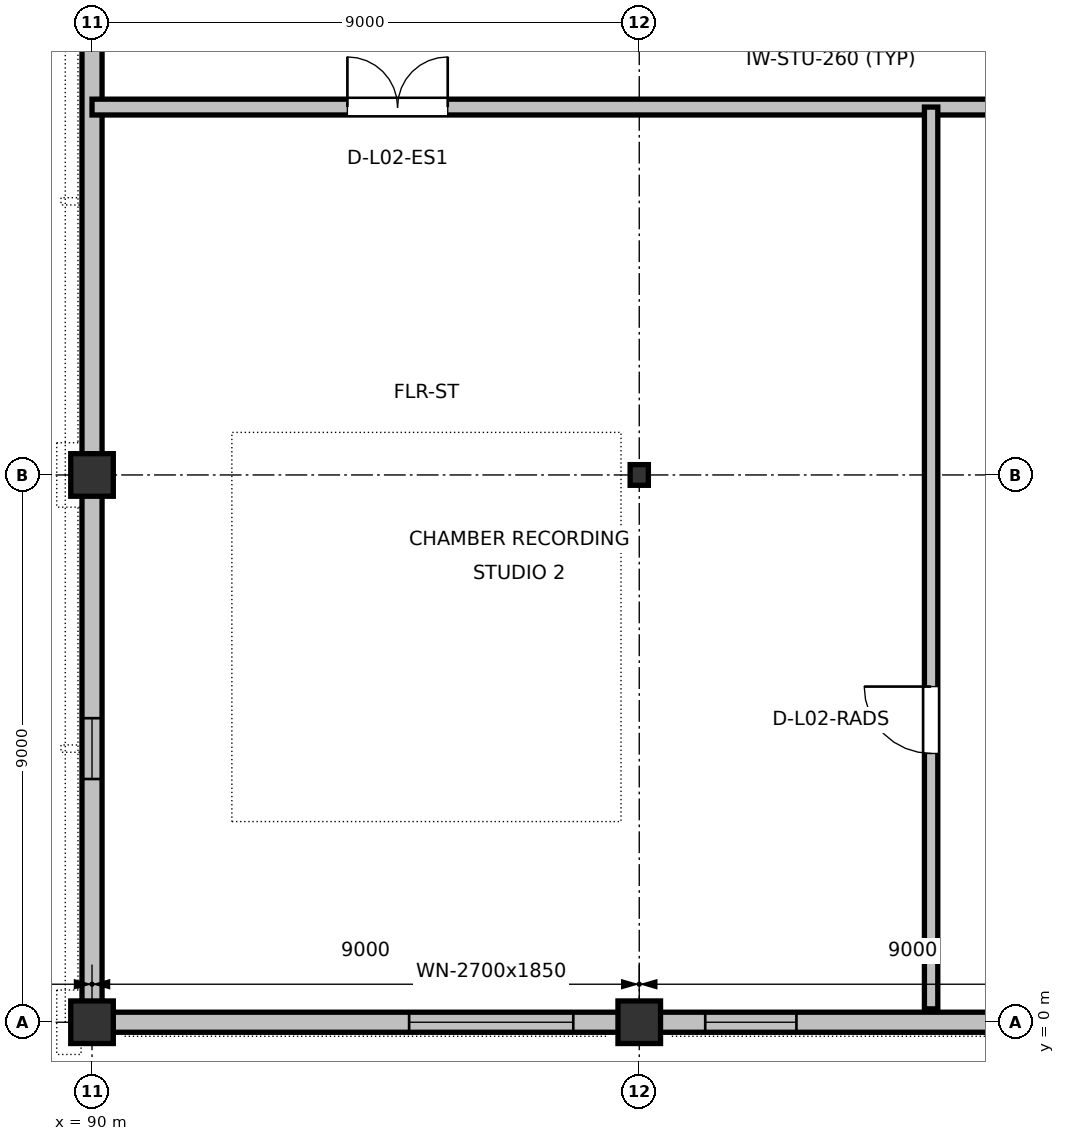
"""IFC4 building model, lengths in metres.
Left out: names, types, materials, properties, quantities, classifications, styles, units other than length and angle.
Written with IfcOpenShell. Run it as: python <this file> out.ifc"""

import sys

from ifc_helpers import new_model, si_unit, direction, frame, frame_2d, origin, origin_2d, place, context, subcontext, project, spatial, rectangle, i_section, extrude, element, fill, save


model = new_model("IFC4")
c1 = context("Model", 3, precision=1e-05, world=origin(), true_north=direction((0.0, 1.0)))
c2 = subcontext(c1, "Body", "Model", "MODEL_VIEW")
j1 = project(units=[si_unit("LENGTHUNIT", "METRE"), si_unit("PLANEANGLEUNIT", "RADIAN")], contexts=[c1])
p1 = place(None, origin())
s1 = spatial("IfcSite", under=j1, at=p1, CompositionType="ELEMENT")
p2 = place(p1, origin())
s2 = spatial("IfcBuilding", under=s1, at=p2, CompositionType="ELEMENT")
p3 = place(p2, frame((0.0, 0.0, 10.2)))
s3 = spatial("IfcBuildingStorey", under=s2, at=p3, CompositionType="ELEMENT", Elevation=10.2)
for number, where, z_axis, x_axis in (
    (1, (90.0, 0.0, 0.0), (0.0, 0.0, 1.0), (1.0, 0.0, 0.0)),
    (2, (90.0, 9.0, 0.0), (0.0, 0.0, 1.0), (1.0, 0.0, 0.0)),
    (3, (99.0, 0.0, 0.0), (0.0, 0.0, 1.0), (1.0, 0.0, 0.0)),
):
    element("IfcColumn", number, at=place(p3, frame(where, z_axis=z_axis, x_axis=x_axis)), inside=s3, PredefinedType="COLUMN", context=c2, shape_type="SweptSolid", body=[
        extrude(rectangle(XDim=0.7, YDim=0.7, at=origin_2d()), origin(), (0.0, 0.0, 1.0), 4.8),
    ])
p4 = place(p3, frame((99.0, 9.0, 0.0), z_axis=(0.0, 0.0, 1.0), x_axis=(1.0, 0.0, 0.0)))
e4 = element("IfcColumn", 4, at=p4, inside=s3, PredefinedType="COLUMN", context=c2, shape_type="SweptSolid", body=[
    extrude(i_section(OverallWidth=0.3, OverallDepth=0.34, WebThickness=0.012, FlangeThickness=0.021, at=origin_2d()), origin(), (0.0, 0.0, 1.0), 4.8),
])
p5 = place(p3, frame((90.0, 8.665, 0.0), z_axis=(0.0, 0.0, 1.0), x_axis=(0.0, -1.0, 0.0)))
e5 = element("IfcWall", 5, at=p5, inside=s3, PredefinedType="STANDARD", context=c2, shape_type="SweptSolid", body=[
    extrude(rectangle(XDim=8.33, YDim=0.33, at=frame_2d((4.165, 0.0))), origin(), (0.0, 0.0, 1.0), 4.235),
])
p6 = place(p5, frame((3.665, 0.0, 0.9)))
e6 = element("IfcOpeningElement", 6, at=p6, cuts=e5, PredefinedType="OPENING", context=c2, shape_type="SweptSolid", body=[
    extrude(rectangle(XDim=1.0, YDim=1.35, at=frame_2d((0.5, 0.675))), frame((0.0, 0.175, 0.0), z_axis=(0.0, -1.0, 0.0), x_axis=(1.0, 0.0, 0.0)), (0.0, 0.0, 1.0), 0.35),
])
p7 = place(p3, frame((90.0, 17.665, 0.0), z_axis=(0.0, 0.0, 1.0), x_axis=(0.0, -1.0, 0.0)))
e7 = element("IfcWall", 7, at=p7, inside=s3, PredefinedType="STANDARD", context=c2, shape_type="SweptSolid", body=[
    extrude(rectangle(XDim=8.33, YDim=0.33, at=frame_2d((4.165, 0.0))), origin(), (0.0, 0.0, 1.0), 4.235),
])
p8 = place(p3, frame((90.335, 0.0, 0.0), z_axis=(0.0, 0.0, 1.0), x_axis=(1.0, 0.0, 0.0)))
e8 = element("IfcWall", 8, at=p8, inside=s3, PredefinedType="STANDARD", context=c2, shape_type="SweptSolid", body=[
    extrude(rectangle(XDim=8.33, YDim=0.33, at=frame_2d((4.165, 0.0))), origin(), (0.0, 0.0, 1.0), 4.235),
])
p9 = place(p8, frame((4.88, 0.0, 0.9)))
e9 = element("IfcOpeningElement", 9, at=p9, cuts=e8, PredefinedType="OPENING", context=c2, shape_type="SweptSolid", body=[
    extrude(rectangle(XDim=2.7, YDim=1.85, at=frame_2d((1.35, 0.925))), frame((0.0, 0.175, 0.0), z_axis=(0.0, -1.0, 0.0), x_axis=(1.0, 0.0, 0.0)), (0.0, 0.0, 1.0), 0.35),
])
p10 = place(p3, frame((99.335, 0.0, 0.0), z_axis=(0.0, 0.0, 1.0), x_axis=(1.0, 0.0, 0.0)))
e10 = element("IfcWall", 10, at=p10, inside=s3, PredefinedType="STANDARD", context=c2, shape_type="SweptSolid", body=[
    extrude(rectangle(XDim=8.33, YDim=0.33, at=frame_2d((4.165, 0.0))), origin(), (0.0, 0.0, 1.0), 4.235),
])
p11 = place(p10, frame((0.75, 0.0, 0.9)))
e11 = element("IfcOpeningElement", 11, at=p11, cuts=e10, PredefinedType="OPENING", context=c2, shape_type="SweptSolid", body=[
    extrude(rectangle(XDim=1.5, YDim=2.2, at=frame_2d((0.75, 1.1))), frame((0.0, 0.175, 0.0), z_axis=(0.0, -1.0, 0.0), x_axis=(1.0, 0.0, 0.0)), (0.0, 0.0, 1.0), 0.35),
])
p12 = place(p3, frame((90.0, 15.05, 0.0), z_axis=(0.0, 0.0, 1.0), x_axis=(1.0, 0.0, 0.0)))
e12 = element("IfcWall", 12, at=p12, inside=s3, PredefinedType="PARTITIONING", context=c2, shape_type="SweptSolid", body=[
    extrude(rectangle(XDim=24.3, YDim=0.26, at=frame_2d((12.15, 0.0))), origin(), (0.0, 0.0, 1.0), 4.215),
])
p13 = place(p12, frame((4.2, 0.0, 0.0)))
e13 = element("IfcOpeningElement", 13, at=p13, cuts=e12, PredefinedType="OPENING", context=c2, shape_type="SweptSolid", body=[
    extrude(rectangle(XDim=1.65, YDim=2.25, at=frame_2d((0.825, 1.125))), frame((0.0, 0.14, 0.0), z_axis=(0.0, -1.0, 0.0), x_axis=(1.0, 0.0, 0.0)), (0.0, 0.0, 1.0), 0.28),
])
p14 = place(p12, frame((16.5, 0.0, 0.0)))
e14 = element("IfcOpeningElement", 14, at=p14, cuts=e12, PredefinedType="OPENING", context=c2, shape_type="SweptSolid", body=[
    extrude(rectangle(XDim=1.45, YDim=2.22, at=frame_2d((0.725, 1.11))), frame((0.0, 0.14, 0.0), z_axis=(0.0, -1.0, 0.0), x_axis=(1.0, 0.0, 0.0)), (0.0, 0.0, 1.0), 0.28),
])
p15 = place(p3, frame((103.8, 0.22, 0.0), z_axis=(0.0, 0.0, 1.0), x_axis=(0.0, 1.0, 0.0)))
e15 = element("IfcWall", 15, at=p15, inside=s3, PredefinedType="PARTITIONING", context=c2, shape_type="SweptSolid", body=[
    extrude(rectangle(XDim=14.83, YDim=0.22, at=frame_2d((7.415, 0.0))), origin(), (0.0, 0.0, 1.0), 4.56),
])
p16 = place(p15, frame((4.2, 0.0, 0.0)))
e16 = element("IfcOpeningElement", 16, at=p16, cuts=e15, PredefinedType="OPENING", context=c2, shape_type="SweptSolid", body=[
    extrude(rectangle(XDim=1.1, YDim=2.16, at=frame_2d((0.55, 1.08))), frame((0.0, 0.12, 0.0), z_axis=(0.0, -1.0, 0.0), x_axis=(1.0, 0.0, 0.0)), (0.0, 0.0, 1.0), 0.24),
])
p17 = place(p6, origin())
e17 = element("IfcWindow", 17, at=p17, inside=s3, PartitioningType="SINGLE_PANEL", PredefinedType="WINDOW", context=c2, shape_type="SweptSolid", body=[
    extrude(rectangle(XDim=1.0, YDim=1.35, at=frame_2d((0.5, 0.675))), frame((0.0, 0.03, 0.0), z_axis=(0.0, -1.0, 0.0), x_axis=(1.0, 0.0, 0.0)), (0.0, 0.0, 1.0), 0.06),
])
fill(e6, e17)
p18 = place(p9, origin())
e18 = element("IfcWindow", 18, at=p18, inside=s3, PartitioningType="SINGLE_PANEL", PredefinedType="WINDOW", context=c2, shape_type="SweptSolid", body=[
    extrude(rectangle(XDim=2.7, YDim=1.85, at=frame_2d((1.35, 0.925))), frame((0.0, 0.03, 0.0), z_axis=(0.0, -1.0, 0.0), x_axis=(1.0, 0.0, 0.0)), (0.0, 0.0, 1.0), 0.06),
])
fill(e9, e18)
p19 = place(p11, origin())
e19 = element("IfcWindow", 19, at=p19, inside=s3, PartitioningType="SINGLE_PANEL", PredefinedType="WINDOW", context=c2, shape_type="SweptSolid", body=[
    extrude(rectangle(XDim=1.5, YDim=2.2, at=frame_2d((0.75, 1.1))), frame((0.0, 0.03, 0.0), z_axis=(0.0, -1.0, 0.0), x_axis=(1.0, 0.0, 0.0)), (0.0, 0.0, 1.0), 0.06),
])
fill(e11, e19)
p20 = place(p13, origin())
e20 = element("IfcDoor", 20, at=p20, inside=s3, OperationType="DOUBLE_DOOR_SINGLE_SWING", PredefinedType="DOOR", context=c2, shape_type="SweptSolid", body=[
    extrude(rectangle(XDim=1.65, YDim=2.25, at=frame_2d((0.825, 1.125))), frame((0.0, 0.025, 0.0), z_axis=(0.0, -1.0, 0.0), x_axis=(1.0, 0.0, 0.0)), (0.0, 0.0, 1.0), 0.05),
])
fill(e13, e20)
p21 = place(p16, origin())
e21 = element("IfcDoor", 21, at=p21, inside=s3, OperationType="SINGLE_SWING_RIGHT", PredefinedType="DOOR", context=c2, shape_type="SweptSolid", body=[
    extrude(rectangle(XDim=1.1, YDim=2.16, at=frame_2d((0.55, 1.08))), frame((0.0, 0.025, 0.0), z_axis=(0.0, -1.0, 0.0), x_axis=(1.0, 0.0, 0.0)), (0.0, 0.0, 1.0), 0.05),
])
fill(e16, e21)
save(model, sys.argv[1])
